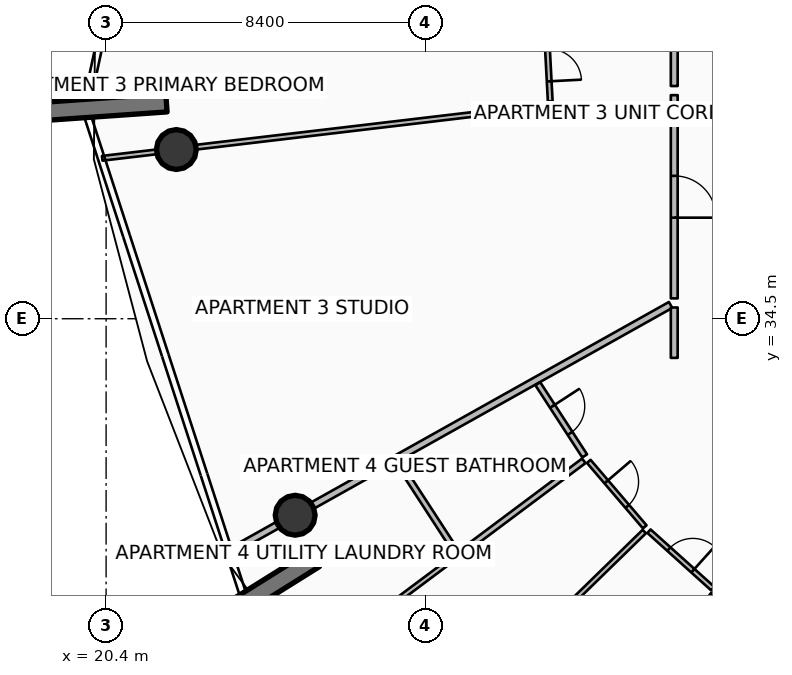
"""IFC4 building model, lengths in metres.
Left out: names, types, materials, properties, quantities, classifications, styles, units other than length and angle.
Written with IfcOpenShell. Run it as: python <this file> out.ifc"""

import sys

from ifc_helpers import new_model, si_unit, direction, frame, frame_2d, origin, origin_2d, place, context, subcontext, project, spatial, rectangle, circle, extrude, element, fill, save


model = new_model("IFC4")
c1 = context("Model", 3, precision=1e-05, world=origin(), true_north=direction((0.0, 1.0)))
c2 = subcontext(c1, "Body", "Model", "MODEL_VIEW")
j1 = project(units=[si_unit("LENGTHUNIT", "METRE"), si_unit("PLANEANGLEUNIT", "RADIAN")], contexts=[c1])
p1 = place(None, origin())
s1 = spatial("IfcSite", under=j1, at=p1, CompositionType="ELEMENT")
p2 = place(p1, origin())
s2 = spatial("IfcBuilding", under=s1, at=p2, CompositionType="ELEMENT")
p3 = place(p2, frame((0.0, 0.0, 199.05)))
s3 = spatial("IfcBuildingStorey", under=s2, at=p3, CompositionType="ELEMENT", Elevation=199.05)
p4 = place(p3, frame((21.987, 40.181, 0.0), z_axis=(0.0, 0.0, 1.0), x_axis=(-0.997568676264, -0.069690287244, 0.0)))
e1 = element("IfcWall", 1, at=p4, inside=s3, PredefinedType="SOLIDWALL", context=c2, shape_type="SweptSolid", body=[
    extrude(rectangle(XDim=3.5, YDim=0.48, at=frame_2d((1.75, 0.0))), origin(), (0.0, 0.0, 1.0), 3.75),
])
p5 = place(p3, frame((25.886, 28.182, 0.0), z_axis=(0.0, 0.0, 1.0), x_axis=(-0.848033572426, -0.529942506352, 0.0)))
e2 = element("IfcWall", 2, at=p5, inside=s3, PredefinedType="SOLIDWALL", context=c2, shape_type="SweptSolid", body=[
    extrude(rectangle(XDim=3.5, YDim=0.48, at=frame_2d((1.75, 0.0))), origin(), (0.0, 0.0, 1.0), 3.75),
])
for number, where, z_axis, x_axis in (
    (3, (22.248, 38.952, 0.0), (0.0, 0.0, 1.0), (1.0, 0.0, 0.0)),
    (4, (25.375, 29.329, 0.0), (0.0, 0.0, 1.0), (1.0, 0.0, 0.0)),
):
    element("IfcColumn", number, at=place(p3, frame(where, z_axis=z_axis, x_axis=x_axis)), inside=s3, PredefinedType="COLUMN", context=c2, shape_type="SweptSolid", body=[
        extrude(circle(Radius=0.525, at=origin_2d()), origin(), (0.0, 0.0, 1.0), 3.5),
    ])
p6 = place(p3, frame((35.254, 34.862, 0.0), z_axis=(0.0, 0.0, 1.0), x_axis=(-0.872489721771, -0.488632464541, 0.0)))
e5 = element("IfcWall", 5, at=p6, inside=s3, PredefinedType="PARTITIONING", context=c2, shape_type="SweptSolid", body=[
    extrude(rectangle(XDim=13.286, YDim=0.18, at=frame_2d((6.643, 0.0))), origin(), (0.0, 0.0, 1.0), 2.94),
])
p7 = place(p3, frame((35.35, 40.383, 0.0), z_axis=(0.0, 0.0, 1.0), x_axis=(0.0, -1.0, 0.0)))
e6 = element("IfcWall", 6, at=p7, inside=s3, PredefinedType="PARTITIONING", context=c2, shape_type="SweptSolid", body=[
    extrude(rectangle(XDim=5.347, YDim=0.18, at=frame_2d((2.674, 0.0))), origin(), (0.0, 0.0, 1.0), 2.94),
])
p8 = place(p7, frame((2.124, 0.0, 0.0)))
e7 = element("IfcOpeningElement", 7, at=p8, cuts=e6, PredefinedType="OPENING", context=c2, shape_type="SweptSolid", body=[
    extrude(rectangle(XDim=1.1, YDim=2.1, at=frame_2d((0.55, 1.05))), frame((0.0, 0.1, 0.0), z_axis=(0.0, -1.0, 0.0), x_axis=(1.0, 0.0, 0.0)), (0.0, 0.0, 1.0), 0.2),
])
p9 = place(p3, frame((35.35, 45.448, 0.0), z_axis=(0.0, 0.0, 1.0), x_axis=(0.0, -1.0, 0.0)))
e8 = element("IfcWall", 8, at=p9, inside=s3, PredefinedType="PARTITIONING", context=c2, shape_type="SweptSolid", body=[
    extrude(rectangle(XDim=4.825, YDim=0.18, at=frame_2d((2.413, 0.0))), origin(), (0.0, 0.0, 1.0), 2.94),
])
p10 = place(p3, frame((31.993, 40.105, 0.0), z_axis=(0.0, 0.0, 1.0), x_axis=(-0.993067142816, -0.117548500026, 0.0)))
e9 = element("IfcWall", 9, at=p10, inside=s3, PredefinedType="PARTITIONING", context=c2, shape_type="SweptSolid", body=[
    extrude(rectangle(XDim=11.776, YDim=0.125, at=frame_2d((5.888, 0.0))), origin(), (0.0, 0.0, 1.0), 2.94),
])
p11 = place(p3, frame((31.987, 42.125, 0.0), z_axis=(0.0, 0.0, 1.0), x_axis=(0.052531998998, -0.998619241293, 0.0)))
e10 = element("IfcWall", 10, at=p11, inside=s3, PredefinedType="PARTITIONING", context=c2, shape_type="SweptSolid", body=[
    extrude(rectangle(XDim=1.91, YDim=0.125, at=frame_2d((0.955, 0.0))), origin(), (0.0, 0.0, 1.0), 2.94),
])
p12 = place(p11, frame((0.53, 0.0, 0.0)))
e11 = element("IfcOpeningElement", 11, at=p12, cuts=e10, PredefinedType="OPENING", context=c2, shape_type="SweptSolid", body=[
    extrude(rectangle(XDim=0.85, YDim=2.06, at=frame_2d((0.425, 1.03))), frame((0.0, 0.073, 0.0), z_axis=(0.0, -1.0, 0.0), x_axis=(1.0, 0.0, 0.0)), (0.0, 0.0, 1.0), 0.145),
])
p13 = place(p3, frame((35.35, 34.796, 0.0), z_axis=(0.0, 0.0, 1.0), x_axis=(0.0, -1.0, 0.0)))
e12 = element("IfcWall", 12, at=p13, inside=s3, PredefinedType="PARTITIONING", context=c2, shape_type="SweptSolid", body=[
    extrude(rectangle(XDim=1.326, YDim=0.18, at=frame_2d((0.663, 0.0))), origin(), (0.0, 0.0, 1.0), 2.94),
])
p14 = place(p3, frame((31.759, 32.79, 0.0), z_axis=(0.0, 0.0, 1.0), x_axis=(0.544988350595, -0.838443616301, 0.0)))
e13 = element("IfcWall", 13, at=p14, inside=s3, PredefinedType="PARTITIONING", context=c2, shape_type="SweptSolid", body=[
    extrude(rectangle(XDim=2.265, YDim=0.15, at=frame_2d((1.133, 0.0))), origin(), (0.0, 0.0, 1.0), 2.94),
])
p15 = place(p14, frame((0.708, 0.0, 0.0)))
e14 = element("IfcOpeningElement", 14, at=p15, cuts=e13, PredefinedType="OPENING", context=c2, shape_type="SweptSolid", body=[
    extrude(rectangle(XDim=0.85, YDim=2.06, at=frame_2d((0.425, 1.03))), frame((0.0, 0.085, 0.0), z_axis=(0.0, -1.0, 0.0), x_axis=(1.0, 0.0, 0.0)), (0.0, 0.0, 1.0), 0.17),
])
p16 = place(p3, frame((28.077, 30.728, 0.0), z_axis=(0.0, 0.0, 1.0), x_axis=(0.544973135676, -0.838453505802, 0.0)))
e15 = element("IfcWall", 15, at=p16, inside=s3, PredefinedType="PARTITIONING", context=c2, shape_type="SweptSolid", body=[
    extrude(rectangle(XDim=2.82, YDim=0.15, at=frame_2d((1.41, 0.0))), origin(), (0.0, 0.0, 1.0), 2.94),
])
p17 = place(p3, frame((32.97, 30.761, 0.0), z_axis=(0.0, 0.0, 1.0), x_axis=(-0.800880183309, -0.598824625398, 0.0)))
e16 = element("IfcWall", 16, at=p17, inside=s3, PredefinedType="PARTITIONING", context=c2, shape_type="SweptSolid", body=[
    extrude(rectangle(XDim=4.09, YDim=0.15, at=frame_2d((2.045, 0.0))), origin(), (0.0, 0.0, 1.0), 2.94),
])
p18 = place(p3, frame((29.591, 28.234, 0.0), z_axis=(0.0, 0.0, 1.0), x_axis=(-0.80085424852, -0.598859309544, 0.0)))
e17 = element("IfcWall", 17, at=p18, inside=s3, PredefinedType="PARTITIONING", context=c2, shape_type="SweptSolid", body=[
    extrude(rectangle(XDim=4.625, YDim=0.125, at=frame_2d((2.313, 0.0))), origin(), (0.0, 0.0, 1.0), 2.94),
])
p19 = place(p18, frame((1.888, 0.0, 0.0)))
e18 = element("IfcOpeningElement", 18, at=p19, cuts=e17, PredefinedType="OPENING", context=c2, shape_type="SweptSolid", body=[
    extrude(rectangle(XDim=0.85, YDim=2.06, at=frame_2d((0.425, 1.03))), frame((0.0, 0.073, 0.0), z_axis=(0.0, -1.0, 0.0), x_axis=(1.0, 0.0, 0.0)), (0.0, 0.0, 1.0), 0.145),
])
p20 = place(p3, frame((34.562, 28.9, 0.0), z_axis=(0.0, 0.0, 1.0), x_axis=(-0.716077779963, -0.698020496148, 0.0)))
e19 = element("IfcWall", 19, at=p20, inside=s3, PredefinedType="PARTITIONING", context=c2, shape_type="SweptSolid", body=[
    extrude(rectangle(XDim=8.369, YDim=0.125, at=frame_2d((4.185, 0.0))), origin(), (0.0, 0.0, 1.0), 2.94),
])
p21 = place(p3, frame((33.101, 30.747, 0.0), z_axis=(0.0, 0.0, 1.0), x_axis=(0.649815270802, -0.760092174564, 0.0)))
e20 = element("IfcWall", 20, at=p21, inside=s3, PredefinedType="PARTITIONING", context=c2, shape_type="SweptSolid", body=[
    extrude(rectangle(XDim=2.267, YDim=0.125, at=frame_2d((1.134, 0.0))), origin(), (0.0, 0.0, 1.0), 2.94),
])
p22 = place(p21, frame((0.708, 0.0, 0.0)))
e21 = element("IfcOpeningElement", 21, at=p22, cuts=e20, PredefinedType="OPENING", context=c2, shape_type="SweptSolid", body=[
    extrude(rectangle(XDim=0.85, YDim=2.06, at=frame_2d((0.425, 1.03))), frame((0.0, 0.073, 0.0), z_axis=(0.0, -1.0, 0.0), x_axis=(1.0, 0.0, 0.0)), (0.0, 0.0, 1.0), 0.145),
])
p23 = place(p3, frame((34.685, 28.909, 0.0), z_axis=(0.0, 0.0, 1.0), x_axis=(0.74323497862, -0.669030467584, 0.0)))
e22 = element("IfcWall", 22, at=p23, inside=s3, PredefinedType="PARTITIONING", context=c2, shape_type="SweptSolid", body=[
    extrude(rectangle(XDim=2.257, YDim=0.125, at=frame_2d((1.128, 0.0))), origin(), (0.0, 0.0, 1.0), 2.94),
])
p24 = place(p23, frame((0.704, 0.0, 0.0)))
e23 = element("IfcOpeningElement", 23, at=p24, cuts=e22, PredefinedType="OPENING", context=c2, shape_type="SweptSolid", body=[
    extrude(rectangle(XDim=0.85, YDim=2.06, at=frame_2d((0.425, 1.03))), frame((0.0, 0.073, 0.0), z_axis=(0.0, -1.0, 0.0), x_axis=(1.0, 0.0, 0.0)), (0.0, 0.0, 1.0), 0.145),
])
p25 = place(p3, frame((36.375, 27.254, 0.0), z_axis=(0.0, 0.0, 1.0), x_axis=(-0.619083134383, -0.785325456561, 0.0)))
e24 = element("IfcWall", 24, at=p25, inside=s3, PredefinedType="PARTITIONING", context=c2, shape_type="SweptSolid", body=[
    extrude(rectangle(XDim=8.353, YDim=0.125, at=frame_2d((4.177, 0.0))), origin(), (0.0, 0.0, 1.0), 2.94),
])
p26 = place(p8, origin())
e25 = element("IfcDoor", 25, at=p26, inside=s3, OperationType="SINGLE_SWING_RIGHT", PredefinedType="DOOR", context=c2, shape_type="SweptSolid", body=[
    extrude(rectangle(XDim=1.1, YDim=2.1, at=frame_2d((0.55, 1.05))), frame((0.0, 0.025, 0.0), z_axis=(0.0, -1.0, 0.0), x_axis=(1.0, 0.0, 0.0)), (0.0, 0.0, 1.0), 0.05),
])
fill(e7, e25)
p27 = place(p12, origin())
e26 = element("IfcDoor", 26, at=p27, inside=s3, OperationType="SINGLE_SWING_RIGHT", PredefinedType="DOOR", context=c2, shape_type="SweptSolid", body=[
    extrude(rectangle(XDim=0.85, YDim=2.06, at=frame_2d((0.425, 1.03))), frame((0.0, 0.025, 0.0), z_axis=(0.0, -1.0, 0.0), x_axis=(1.0, 0.0, 0.0)), (0.0, 0.0, 1.0), 0.05),
])
fill(e11, e26)
p28 = place(p15, origin())
e27 = element("IfcDoor", 27, at=p28, inside=s3, OperationType="SINGLE_SWING_LEFT", PredefinedType="DOOR", context=c2, shape_type="SweptSolid", body=[
    extrude(rectangle(XDim=0.85, YDim=2.06, at=frame_2d((0.425, 1.03))), frame((0.0, 0.025, 0.0), z_axis=(0.0, -1.0, 0.0), x_axis=(1.0, 0.0, 0.0)), (0.0, 0.0, 1.0), 0.05),
])
fill(e14, e27)
p29 = place(p22, origin())
e28 = element("IfcDoor", 28, at=p29, inside=s3, OperationType="SINGLE_SWING_LEFT", PredefinedType="DOOR", context=c2, shape_type="SweptSolid", body=[
    extrude(rectangle(XDim=0.85, YDim=2.06, at=frame_2d((0.425, 1.03))), frame((0.0, 0.025, 0.0), z_axis=(0.0, -1.0, 0.0), x_axis=(1.0, 0.0, 0.0)), (0.0, 0.0, 1.0), 0.05),
])
fill(e21, e28)
p30 = place(p24, origin())
e29 = element("IfcDoor", 29, at=p30, inside=s3, OperationType="SINGLE_SWING_RIGHT", PredefinedType="DOOR", context=c2, shape_type="SweptSolid", body=[
    extrude(rectangle(XDim=0.85, YDim=2.06, at=frame_2d((0.425, 1.03))), frame((0.0, 0.025, 0.0), z_axis=(0.0, -1.0, 0.0), x_axis=(1.0, 0.0, 0.0)), (0.0, 0.0, 1.0), 0.05),
])
fill(e23, e29)
save(model, sys.argv[1])
